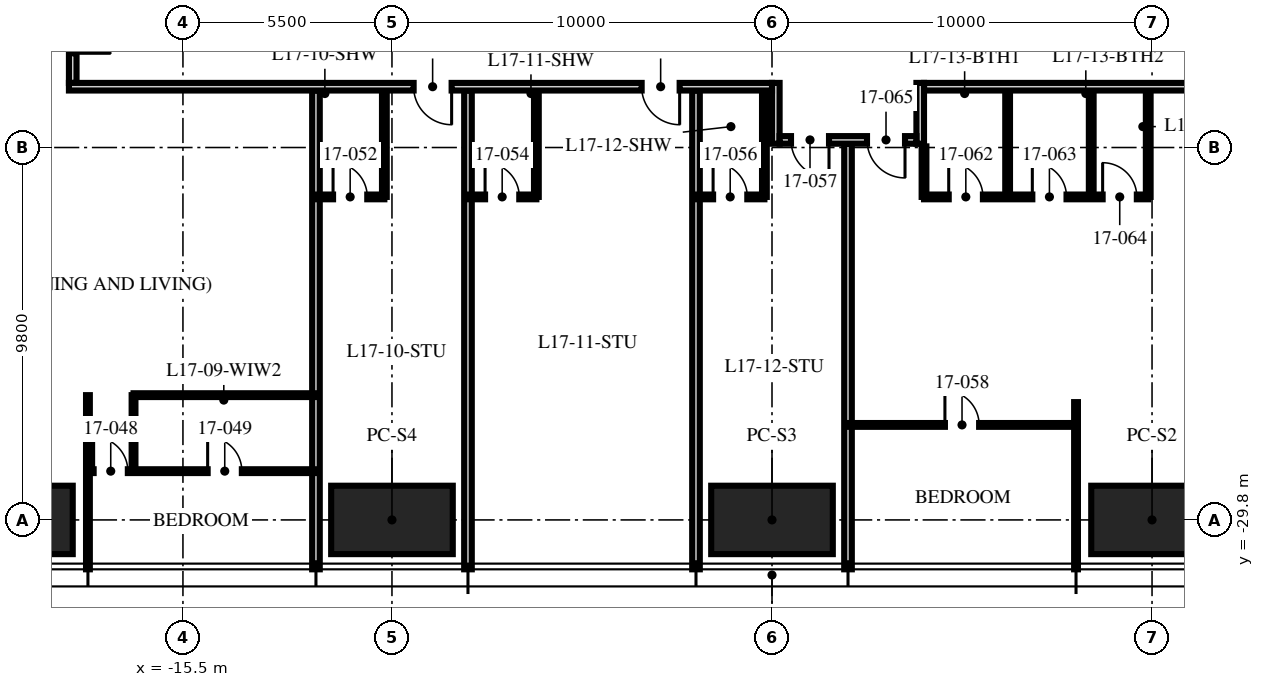
"""IFC4 building model, lengths in metres.
Left out: names, types, materials, properties, quantities, classifications, styles, units other than length and angle.
Written with IfcOpenShell. Run it as: python <this file> out.ifc"""

import sys

from ifc_helpers import new_model, si_unit, direction, frame, frame_2d, origin, origin_2d, place, context, subcontext, project, spatial, rectangle, hollow_rectangle, extrude, element, fill, save


model = new_model("IFC4")
c1 = context("Model", 3, precision=1e-05, world=origin(), true_north=direction((0.0, 1.0)))
c2 = subcontext(c1, "Body", "Model", "MODEL_VIEW")
j1 = project(units=[si_unit("LENGTHUNIT", "METRE"), si_unit("PLANEANGLEUNIT", "RADIAN")], contexts=[c1])
p1 = place(None, origin())
s1 = spatial("IfcSite", under=j1, at=p1, CompositionType="ELEMENT")
p2 = place(p1, origin())
s2 = spatial("IfcBuilding", under=s1, at=p2, CompositionType="ELEMENT")
p3 = place(p2, frame((0.0, 0.0, 69.75)))
s3 = spatial("IfcBuildingStorey", under=s2, at=p3, CompositionType="ELEMENT", Elevation=69.75)
for number, where, z_axis, x_axis in (
    (1, (10.0, -29.8, 0.0), (0.0, 0.0, 1.0), (1.0, 0.0, 0.0)),
    (2, (0.0, -29.8, 0.0), (0.0, 0.0, 1.0), (1.0, 0.0, 0.0)),
    (3, (-10.0, -29.8, 0.0), (0.0, 0.0, 1.0), (1.0, 0.0, 0.0)),
    (4, (-20.0, -29.8, 0.0), (0.0, 0.0, 1.0), (1.0, 0.0, 0.0)),
):
    element("IfcColumn", number, at=place(p3, frame(where, z_axis=z_axis, x_axis=x_axis)), inside=s3, PredefinedType="COLUMN", context=c2, shape_type="SweptSolid", body=[
        extrude(hollow_rectangle(XDim=3.2, YDim=1.8, WallThickness=0.2, at=origin_2d()), origin(), (0.0, 0.0, 1.0), 3.75),
    ])
p4 = place(p3, frame((-18.0, -26.517, 0.0), z_axis=(0.0, 0.0, 1.0), x_axis=(0.0, -1.0, 0.0)))
e5 = element("IfcWall", 5, at=p4, inside=s3, PredefinedType="PARTITIONING", context=c2, shape_type="SweptSolid", body=[
    extrude(rectangle(XDim=4.583, YDim=0.1, at=frame_2d((2.292, 0.0))), origin(), (0.0, 0.0, 1.0), 2.71),
])
for number, where, z_axis, x_axis in (
    (6, (-12.0, -18.5, 0.0), (0.0, 0.0, 1.0), (0.0, -1.0, 0.0)),
    (7, (-8.0, -18.5, 0.0), (0.0, 0.0, 1.0), (0.0, -1.0, 0.0)),
    (8, (-2.0, -18.5, 0.0), (0.0, 0.0, 1.0), (0.0, -1.0, 0.0)),
):
    element("IfcWall", number, at=place(p3, frame(where, z_axis=z_axis, x_axis=x_axis)), inside=s3, PredefinedType="PARTITIONING", context=c2, shape_type="SweptSolid", body=[
        extrude(rectangle(XDim=12.6, YDim=0.2, at=frame_2d((6.3, 0.0))), origin(), (0.0, 0.0, 1.0), 2.71),
    ])
p5 = place(p3, frame((2.0, -19.9, 0.0), z_axis=(0.0, 0.0, 1.0), x_axis=(0.0, -1.0, 0.0)))
e9 = element("IfcWall", 9, at=p5, inside=s3, PredefinedType="PARTITIONING", context=c2, shape_type="SweptSolid", body=[
    extrude(rectangle(XDim=11.2, YDim=0.2, at=frame_2d((5.6, 0.0))), origin(), (0.0, 0.0, 1.0), 2.71),
])
p6 = place(p3, frame((8.0, -26.7, 0.0), z_axis=(0.0, 0.0, 1.0), x_axis=(0.0, -1.0, 0.0)))
e10 = element("IfcWall", 10, at=p6, inside=s3, PredefinedType="PARTITIONING", context=c2, shape_type="SweptSolid", body=[
    extrude(rectangle(XDim=4.4, YDim=0.1, at=frame_2d((2.2, 0.0))), origin(), (0.0, 0.0, 1.0), 2.71),
])
p7 = place(p3, frame((-18.0, -28.517, 0.0), z_axis=(0.0, 0.0, 1.0), x_axis=(1.0, 0.0, 0.0)))
e11 = element("IfcWall", 11, at=p7, inside=s3, PredefinedType="PARTITIONING", context=c2, shape_type="SweptSolid", body=[
    extrude(rectangle(XDim=6.0, YDim=0.1, at=frame_2d((3.0, 0.0))), origin(), (0.0, 0.0, 1.0), 2.61),
])
p8 = place(p7, frame((0.15, 0.0, 0.0)))
e12 = element("IfcOpeningElement", 12, at=p8, cuts=e11, PredefinedType="OPENING", context=c2, shape_type="SweptSolid", body=[
    extrude(rectangle(XDim=0.9, YDim=2.1, at=frame_2d((0.45, 1.05))), frame((0.0, 0.06, 0.0), z_axis=(0.0, -1.0, 0.0), x_axis=(1.0, 0.0, 0.0)), (0.0, 0.0, 1.0), 0.12),
])
p9 = place(p7, frame((3.15, 0.0, 0.0)))
e13 = element("IfcOpeningElement", 13, at=p9, cuts=e11, PredefinedType="OPENING", context=c2, shape_type="SweptSolid", body=[
    extrude(rectangle(XDim=0.9, YDim=2.1, at=frame_2d((0.45, 1.05))), frame((0.0, 0.06, 0.0), z_axis=(0.0, -1.0, 0.0), x_axis=(1.0, 0.0, 0.0)), (0.0, 0.0, 1.0), 0.12),
])
p10 = place(p3, frame((-16.8, -26.517, 0.0), z_axis=(0.0, 0.0, 1.0), x_axis=(0.0, -1.0, 0.0)))
e14 = element("IfcWall", 14, at=p10, inside=s3, PredefinedType="PARTITIONING", context=c2, shape_type="SweptSolid", body=[
    extrude(rectangle(XDim=2.0, YDim=0.1, at=frame_2d((1.0, 0.0))), origin(), (0.0, 0.0, 1.0), 3.5),
])
p11 = place(p3, frame((-16.8, -26.517, 0.0), z_axis=(0.0, 0.0, 1.0), x_axis=(1.0, 0.0, 0.0)))
e15 = element("IfcWall", 15, at=p11, inside=s3, PredefinedType="PARTITIONING", context=c2, shape_type="SweptSolid", body=[
    extrude(rectangle(XDim=4.8, YDim=0.1, at=frame_2d((2.4, 0.0))), origin(), (0.0, 0.0, 1.0), 2.61),
])
p12 = place(p3, frame((-12.0, -21.3, 0.0), z_axis=(0.0, 0.0, 1.0), x_axis=(1.0, 0.0, 0.0)))
e16 = element("IfcWall", 16, at=p12, inside=s3, PredefinedType="PARTITIONING", context=c2, shape_type="SweptSolid", body=[
    extrude(rectangle(XDim=1.8, YDim=0.125, at=frame_2d((0.9, 0.0))), origin(), (0.0, 0.0, 1.0), 3.5),
])
p13 = place(p12, frame((0.45, 0.0, 0.0)))
e17 = element("IfcOpeningElement", 17, at=p13, cuts=e16, PredefinedType="OPENING", context=c2, shape_type="SweptSolid", body=[
    extrude(rectangle(XDim=0.9, YDim=2.1, at=frame_2d((0.45, 1.05))), frame((0.0, 0.073, 0.0), z_axis=(0.0, -1.0, 0.0), x_axis=(1.0, 0.0, 0.0)), (0.0, 0.0, 1.0), 0.145),
])
p14 = place(p3, frame((-10.2, -18.5, 0.0), z_axis=(0.0, 0.0, 1.0), x_axis=(0.0, -1.0, 0.0)))
e18 = element("IfcWall", 18, at=p14, inside=s3, PredefinedType="PARTITIONING", context=c2, shape_type="SweptSolid", body=[
    extrude(rectangle(XDim=2.8, YDim=0.125, at=frame_2d((1.4, 0.0))), origin(), (0.0, 0.0, 1.0), 2.492),
])
p15 = place(p3, frame((-8.0, -21.3, 0.0), z_axis=(0.0, 0.0, 1.0), x_axis=(1.0, 0.0, 0.0)))
e19 = element("IfcWall", 19, at=p15, inside=s3, PredefinedType="PARTITIONING", context=c2, shape_type="SweptSolid", body=[
    extrude(rectangle(XDim=1.8, YDim=0.125, at=frame_2d((0.9, 0.0))), origin(), (0.0, 0.0, 1.0), 3.5),
])
p16 = place(p15, frame((0.45, 0.0, 0.0)))
e20 = element("IfcOpeningElement", 20, at=p16, cuts=e19, PredefinedType="OPENING", context=c2, shape_type="SweptSolid", body=[
    extrude(rectangle(XDim=0.9, YDim=2.1, at=frame_2d((0.45, 1.05))), frame((0.0, 0.073, 0.0), z_axis=(0.0, -1.0, 0.0), x_axis=(1.0, 0.0, 0.0)), (0.0, 0.0, 1.0), 0.145),
])
p17 = place(p3, frame((-6.2, -18.5, 0.0), z_axis=(0.0, 0.0, 1.0), x_axis=(0.0, -1.0, 0.0)))
e21 = element("IfcWall", 21, at=p17, inside=s3, PredefinedType="PARTITIONING", context=c2, shape_type="SweptSolid", body=[
    extrude(rectangle(XDim=2.8, YDim=0.125, at=frame_2d((1.4, 0.0))), origin(), (0.0, 0.0, 1.0), 3.5),
])
p18 = place(p3, frame((-2.0, -21.3, 0.0), z_axis=(0.0, 0.0, 1.0), x_axis=(1.0, 0.0, 0.0)))
e22 = element("IfcWall", 22, at=p18, inside=s3, PredefinedType="PARTITIONING", context=c2, shape_type="SweptSolid", body=[
    extrude(rectangle(XDim=1.8, YDim=0.125, at=frame_2d((0.9, 0.0))), origin(), (0.0, 0.0, 1.0), 3.5),
])
p19 = place(p18, frame((0.45, 0.0, 0.0)))
e23 = element("IfcOpeningElement", 23, at=p19, cuts=e22, PredefinedType="OPENING", context=c2, shape_type="SweptSolid", body=[
    extrude(rectangle(XDim=0.9, YDim=2.1, at=frame_2d((0.45, 1.05))), frame((0.0, 0.073, 0.0), z_axis=(0.0, -1.0, 0.0), x_axis=(1.0, 0.0, 0.0)), (0.0, 0.0, 1.0), 0.145),
])
p20 = place(p3, frame((-0.2, -18.5, 0.0), z_axis=(0.0, 0.0, 1.0), x_axis=(0.0, -1.0, 0.0)))
e24 = element("IfcWall", 24, at=p20, inside=s3, PredefinedType="PARTITIONING", context=c2, shape_type="SweptSolid", body=[
    extrude(rectangle(XDim=2.8, YDim=0.125, at=frame_2d((1.4, 0.0))), origin(), (0.0, 0.0, 1.0), 2.492),
])
p21 = place(p3, frame((2.0, -27.3, 0.0), z_axis=(0.0, 0.0, 1.0), x_axis=(1.0, 0.0, 0.0)))
e25 = element("IfcWall", 25, at=p21, inside=s3, PredefinedType="PARTITIONING", context=c2, shape_type="SweptSolid", body=[
    extrude(rectangle(XDim=6.0, YDim=0.1, at=frame_2d((3.0, 0.0))), origin(), (0.0, 0.0, 1.0), 2.61),
])
p22 = place(p21, frame((2.55, 0.0, 0.0)))
e26 = element("IfcOpeningElement", 26, at=p22, cuts=e25, PredefinedType="OPENING", context=c2, shape_type="SweptSolid", body=[
    extrude(rectangle(XDim=0.9, YDim=2.1, at=frame_2d((0.45, 1.05))), frame((0.0, 0.06, 0.0), z_axis=(0.0, -1.0, 0.0), x_axis=(1.0, 0.0, 0.0)), (0.0, 0.0, 1.0), 0.12),
])
p23 = place(p3, frame((4.0, -21.3, 0.0), z_axis=(0.0, 0.0, 1.0), x_axis=(1.0, 0.0, 0.0)))
e27 = element("IfcWall", 27, at=p23, inside=s3, PredefinedType="PARTITIONING", context=c2, shape_type="SweptSolid", body=[
    extrude(rectangle(XDim=5.9, YDim=0.125, at=frame_2d((2.95, 0.0))), origin(), (0.0, 0.0, 1.0), 2.492),
])
p24 = place(p23, frame((0.65, 0.0, 0.0)))
e28 = element("IfcOpeningElement", 28, at=p24, cuts=e27, PredefinedType="OPENING", context=c2, shape_type="SweptSolid", body=[
    extrude(rectangle(XDim=0.9, YDim=2.1, at=frame_2d((0.45, 1.05))), frame((0.0, 0.073, 0.0), z_axis=(0.0, -1.0, 0.0), x_axis=(1.0, 0.0, 0.0)), (0.0, 0.0, 1.0), 0.145),
])
p25 = place(p23, frame((2.85, 0.0, 0.0)))
e29 = element("IfcOpeningElement", 29, at=p25, cuts=e27, PredefinedType="OPENING", context=c2, shape_type="SweptSolid", body=[
    extrude(rectangle(XDim=0.9, YDim=2.1, at=frame_2d((0.45, 1.05))), frame((0.0, 0.073, 0.0), z_axis=(0.0, -1.0, 0.0), x_axis=(1.0, 0.0, 0.0)), (0.0, 0.0, 1.0), 0.145),
])
p26 = place(p23, frame((4.7, 0.0, 0.0)))
e30 = element("IfcOpeningElement", 30, at=p26, cuts=e27, PredefinedType="OPENING", context=c2, shape_type="SweptSolid", body=[
    extrude(rectangle(XDim=0.9, YDim=2.1, at=frame_2d((0.45, 1.05))), frame((0.0, 0.073, 0.0), z_axis=(0.0, -1.0, 0.0), x_axis=(1.0, 0.0, 0.0)), (0.0, 0.0, 1.0), 0.145),
])
p27 = place(p3, frame((4.0, -19.97, 0.0), z_axis=(0.0, 0.0, 1.0), x_axis=(0.0, -1.0, 0.0)))
e31 = element("IfcWall", 31, at=p27, inside=s3, PredefinedType="PARTITIONING", context=c2, shape_type="SweptSolid", body=[
    extrude(rectangle(XDim=1.33, YDim=0.125, at=frame_2d((0.665, 0.0))), origin(), (0.0, 0.0, 1.0), 3.5),
])
for number, where, z_axis, x_axis in (
    (32, (6.2, -18.5, 0.0), (0.0, 0.0, 1.0), (0.0, -1.0, 0.0)),
    (33, (8.4, -18.5, 0.0), (0.0, 0.0, 1.0), (0.0, -1.0, 0.0)),
):
    element("IfcWall", number, at=place(p3, frame(where, z_axis=z_axis, x_axis=x_axis)), inside=s3, PredefinedType="PARTITIONING", context=c2, shape_type="SweptSolid", body=[
        extrude(rectangle(XDim=2.8, YDim=0.125, at=frame_2d((1.4, 0.0))), origin(), (0.0, 0.0, 1.0), 3.5),
    ])
p28 = place(p3, frame((9.9, -18.5, 0.0), z_axis=(0.0, 0.0, 1.0), x_axis=(0.0, -1.0, 0.0)))
e34 = element("IfcWall", 34, at=p28, inside=s3, PredefinedType="PARTITIONING", context=c2, shape_type="SweptSolid", body=[
    extrude(rectangle(XDim=2.8, YDim=0.125, at=frame_2d((1.4, 0.0))), origin(), (0.0, 0.0, 1.0), 2.492),
])
p29 = place(p3, frame((-18.4, 18.3, 0.0), z_axis=(0.0, 0.0, 1.0), x_axis=(0.0, -1.0, 0.0)))
e35 = element("IfcWall", 35, at=p29, inside=s3, PredefinedType="PARTITIONING", context=c2, shape_type="SweptSolid", body=[
    extrude(rectangle(XDim=36.6, YDim=0.2, at=frame_2d((18.3, 0.0))), origin(), (0.0, 0.0, 1.0), 2.3),
])
p30 = place(p29, frame((8.57, 0.0, 0.0)))
e36 = element("IfcOpeningElement", 36, at=p30, cuts=e35, PredefinedType="OPENING", context=c2, shape_type="SweptSolid", body=[
    extrude(rectangle(XDim=1.0, YDim=2.2, at=frame_2d((0.5, 1.1))), frame((0.0, 0.11, 0.0), z_axis=(0.0, -1.0, 0.0), x_axis=(1.0, 0.0, 0.0)), (0.0, 0.0, 1.0), 0.22),
])
p31 = place(p29, frame((14.87, 0.0, 0.0)))
e37 = element("IfcOpeningElement", 37, at=p31, cuts=e35, PredefinedType="OPENING", context=c2, shape_type="SweptSolid", body=[
    extrude(rectangle(XDim=1.0, YDim=2.2, at=frame_2d((0.5, 1.1))), frame((0.0, 0.11, 0.0), z_axis=(0.0, -1.0, 0.0), x_axis=(1.0, 0.0, 0.0)), (0.0, 0.0, 1.0), 0.22),
])
p32 = place(p29, frame((18.87, 0.0, 0.0)))
e38 = element("IfcOpeningElement", 38, at=p32, cuts=e35, PredefinedType="OPENING", context=c2, shape_type="SweptSolid", body=[
    extrude(rectangle(XDim=1.0, YDim=2.2, at=frame_2d((0.5, 1.1))), frame((0.0, 0.11, 0.0), z_axis=(0.0, -1.0, 0.0), x_axis=(1.0, 0.0, 0.0)), (0.0, 0.0, 1.0), 0.22),
])
p33 = place(p29, frame((34.82, 0.0, 0.0)))
e39 = element("IfcOpeningElement", 39, at=p33, cuts=e35, PredefinedType="OPENING", context=c2, shape_type="SweptSolid", body=[
    extrude(rectangle(XDim=1.0, YDim=2.2, at=frame_2d((0.5, 1.1))), frame((0.0, 0.11, 0.0), z_axis=(0.0, -1.0, 0.0), x_axis=(1.0, 0.0, 0.0)), (0.0, 0.0, 1.0), 0.22),
])
p34 = place(p3, frame((18.5, -18.4, 0.0), z_axis=(0.0, 0.0, 1.0), x_axis=(-1.0, 0.0, 0.0)))
e40 = element("IfcWall", 40, at=p34, inside=s3, PredefinedType="PARTITIONING", context=c2, shape_type="SweptSolid", body=[
    extrude(rectangle(XDim=14.5, YDim=0.2, at=frame_2d((7.25, 0.0))), origin(), (0.0, 0.0, 1.0), 2.3),
])
p35 = place(p3, frame((3.9, -18.3, 0.0), z_axis=(0.0, 0.0, 1.0), x_axis=(0.0, -1.0, 0.0)))
e41 = element("IfcWall", 41, at=p35, inside=s3, PredefinedType="PARTITIONING", context=c2, shape_type="SweptSolid", body=[
    extrude(rectangle(XDim=1.6, YDim=0.2, at=frame_2d((0.8, 0.0))), origin(), (0.0, 0.0, 1.0), 3.5),
])
p36 = place(p3, frame((0.1, -18.3, 0.0), z_axis=(0.0, 0.0, 1.0), x_axis=(0.0, -1.0, 0.0)))
e42 = element("IfcWall", 42, at=p36, inside=s3, PredefinedType="PARTITIONING", context=c2, shape_type="SweptSolid", body=[
    extrude(rectangle(XDim=1.6, YDim=0.2, at=frame_2d((0.8, 0.0))), origin(), (0.0, 0.0, 1.0), 2.492),
])
p37 = place(p3, frame((3.8, -19.8, 0.0), z_axis=(0.0, 0.0, 1.0), x_axis=(-1.0, 0.0, 0.0)))
e43 = element("IfcWall", 43, at=p37, inside=s3, PredefinedType="PARTITIONING", context=c2, shape_type="SweptSolid", body=[
    extrude(rectangle(XDim=3.6, YDim=0.2, at=frame_2d((1.8, 0.0))), origin(), (0.0, 0.0, 1.0), 3.5),
])
p38 = place(p37, frame((2.3, 0.0, 0.0)))
e44 = element("IfcOpeningElement", 44, at=p38, cuts=e43, PredefinedType="OPENING", context=c2, shape_type="SweptSolid", body=[
    extrude(rectangle(XDim=1.0, YDim=2.2, at=frame_2d((0.5, 1.1))), frame((0.0, 0.11, 0.0), z_axis=(0.0, -1.0, 0.0), x_axis=(1.0, 0.0, 0.0)), (0.0, 0.0, 1.0), 0.22),
])
p39 = place(p37, frame((0.3, 0.0, 0.0)))
e45 = element("IfcOpeningElement", 45, at=p39, cuts=e43, PredefinedType="OPENING", context=c2, shape_type="SweptSolid", body=[
    extrude(rectangle(XDim=1.0, YDim=2.2, at=frame_2d((0.5, 1.1))), frame((0.0, 0.11, 0.0), z_axis=(0.0, -1.0, 0.0), x_axis=(1.0, 0.0, 0.0)), (0.0, 0.0, 1.0), 0.22),
])
p40 = place(p3, frame((0.0, -18.4, 0.0), z_axis=(0.0, 0.0, 1.0), x_axis=(-1.0, 0.0, 0.0)))
e46 = element("IfcWall", 46, at=p40, inside=s3, PredefinedType="PARTITIONING", context=c2, shape_type="SweptSolid", body=[
    extrude(rectangle(XDim=18.5, YDim=0.2, at=frame_2d((9.25, 0.0))), origin(), (0.0, 0.0, 1.0), 2.3),
])
p41 = place(p40, frame((8.43, 0.0, 0.0)))
e47 = element("IfcOpeningElement", 47, at=p41, cuts=e46, PredefinedType="OPENING", context=c2, shape_type="SweptSolid", body=[
    extrude(rectangle(XDim=1.0, YDim=2.2, at=frame_2d((0.5, 1.1))), frame((0.0, 0.11, 0.0), z_axis=(0.0, -1.0, 0.0), x_axis=(1.0, 0.0, 0.0)), (0.0, 0.0, 1.0), 0.22),
])
p42 = place(p40, frame((2.43, 0.0, 0.0)))
e48 = element("IfcOpeningElement", 48, at=p42, cuts=e46, PredefinedType="OPENING", context=c2, shape_type="SweptSolid", body=[
    extrude(rectangle(XDim=1.0, YDim=2.2, at=frame_2d((0.5, 1.1))), frame((0.0, 0.11, 0.0), z_axis=(0.0, -1.0, 0.0), x_axis=(1.0, 0.0, 0.0)), (0.0, 0.0, 1.0), 0.22),
])
p43 = place(p8, origin())
e49 = element("IfcDoor", 49, at=p43, inside=s3, OperationType="SINGLE_SWING_LEFT", PredefinedType="DOOR", context=c2, shape_type="SweptSolid", body=[
    extrude(rectangle(XDim=0.9, YDim=2.1, at=frame_2d((0.45, 1.05))), frame((0.0, 0.025, 0.0), z_axis=(0.0, -1.0, 0.0), x_axis=(1.0, 0.0, 0.0)), (0.0, 0.0, 1.0), 0.05),
])
fill(e12, e49)
p44 = place(p9, origin())
e50 = element("IfcDoor", 50, at=p44, inside=s3, OperationType="SINGLE_SWING_LEFT", PredefinedType="DOOR", context=c2, shape_type="SweptSolid", body=[
    extrude(rectangle(XDim=0.9, YDim=2.1, at=frame_2d((0.45, 1.05))), frame((0.0, 0.025, 0.0), z_axis=(0.0, -1.0, 0.0), x_axis=(1.0, 0.0, 0.0)), (0.0, 0.0, 1.0), 0.05),
])
fill(e13, e50)
p45 = place(p33, origin())
e51 = element("IfcDoor", 51, at=p45, inside=s3, OperationType="SINGLE_SWING_RIGHT", PredefinedType="DOOR", context=c2, shape_type="SweptSolid", body=[
    extrude(rectangle(XDim=1.0, YDim=2.2, at=frame_2d((0.5, 1.1))), frame((0.0, 0.025, 0.0), z_axis=(0.0, -1.0, 0.0), x_axis=(1.0, 0.0, 0.0)), (0.0, 0.0, 1.0), 0.05),
])
fill(e39, e51)
p46 = place(p13, origin())
e52 = element("IfcDoor", 52, at=p46, inside=s3, OperationType="SINGLE_SWING_LEFT", PredefinedType="DOOR", context=c2, shape_type="SweptSolid", body=[
    extrude(rectangle(XDim=0.9, YDim=2.1, at=frame_2d((0.45, 1.05))), frame((0.0, 0.025, 0.0), z_axis=(0.0, -1.0, 0.0), x_axis=(1.0, 0.0, 0.0)), (0.0, 0.0, 1.0), 0.05),
])
fill(e17, e52)
p47 = place(p41, origin())
e53 = element("IfcDoor", 53, at=p47, inside=s3, OperationType="SINGLE_SWING_LEFT", PredefinedType="DOOR", context=c2, shape_type="SweptSolid", body=[
    extrude(rectangle(XDim=1.0, YDim=2.2, at=frame_2d((0.5, 1.1))), frame((0.0, 0.025, 0.0), z_axis=(0.0, -1.0, 0.0), x_axis=(1.0, 0.0, 0.0)), (0.0, 0.0, 1.0), 0.05),
])
fill(e47, e53)
p48 = place(p16, origin())
e54 = element("IfcDoor", 54, at=p48, inside=s3, OperationType="SINGLE_SWING_LEFT", PredefinedType="DOOR", context=c2, shape_type="SweptSolid", body=[
    extrude(rectangle(XDim=0.9, YDim=2.1, at=frame_2d((0.45, 1.05))), frame((0.0, 0.025, 0.0), z_axis=(0.0, -1.0, 0.0), x_axis=(1.0, 0.0, 0.0)), (0.0, 0.0, 1.0), 0.05),
])
fill(e20, e54)
p49 = place(p42, origin())
e55 = element("IfcDoor", 55, at=p49, inside=s3, OperationType="SINGLE_SWING_LEFT", PredefinedType="DOOR", context=c2, shape_type="SweptSolid", body=[
    extrude(rectangle(XDim=1.0, YDim=2.2, at=frame_2d((0.5, 1.1))), frame((0.0, 0.025, 0.0), z_axis=(0.0, -1.0, 0.0), x_axis=(1.0, 0.0, 0.0)), (0.0, 0.0, 1.0), 0.05),
])
fill(e48, e55)
p50 = place(p19, origin())
e56 = element("IfcDoor", 56, at=p50, inside=s3, OperationType="SINGLE_SWING_LEFT", PredefinedType="DOOR", context=c2, shape_type="SweptSolid", body=[
    extrude(rectangle(XDim=0.9, YDim=2.1, at=frame_2d((0.45, 1.05))), frame((0.0, 0.025, 0.0), z_axis=(0.0, -1.0, 0.0), x_axis=(1.0, 0.0, 0.0)), (0.0, 0.0, 1.0), 0.05),
])
fill(e23, e56)
p51 = place(p38, origin())
e57 = element("IfcDoor", 57, at=p51, inside=s3, OperationType="SINGLE_SWING_LEFT", PredefinedType="DOOR", context=c2, shape_type="SweptSolid", body=[
    extrude(rectangle(XDim=1.0, YDim=2.2, at=frame_2d((0.5, 1.1))), frame((0.0, 0.025, 0.0), z_axis=(0.0, -1.0, 0.0), x_axis=(1.0, 0.0, 0.0)), (0.0, 0.0, 1.0), 0.05),
])
fill(e44, e57)
p52 = place(p22, origin())
e58 = element("IfcDoor", 58, at=p52, inside=s3, OperationType="SINGLE_SWING_LEFT", PredefinedType="DOOR", context=c2, shape_type="SweptSolid", body=[
    extrude(rectangle(XDim=0.9, YDim=2.1, at=frame_2d((0.45, 1.05))), frame((0.0, 0.025, 0.0), z_axis=(0.0, -1.0, 0.0), x_axis=(1.0, 0.0, 0.0)), (0.0, 0.0, 1.0), 0.05),
])
fill(e26, e58)
p53 = place(p24, origin())
e59 = element("IfcDoor", 59, at=p53, inside=s3, OperationType="SINGLE_SWING_LEFT", PredefinedType="DOOR", context=c2, shape_type="SweptSolid", body=[
    extrude(rectangle(XDim=0.9, YDim=2.1, at=frame_2d((0.45, 1.05))), frame((0.0, 0.025, 0.0), z_axis=(0.0, -1.0, 0.0), x_axis=(1.0, 0.0, 0.0)), (0.0, 0.0, 1.0), 0.05),
])
fill(e28, e59)
p54 = place(p25, origin())
e60 = element("IfcDoor", 60, at=p54, inside=s3, OperationType="SINGLE_SWING_LEFT", PredefinedType="DOOR", context=c2, shape_type="SweptSolid", body=[
    extrude(rectangle(XDim=0.9, YDim=2.1, at=frame_2d((0.45, 1.05))), frame((0.0, 0.025, 0.0), z_axis=(0.0, -1.0, 0.0), x_axis=(1.0, 0.0, 0.0)), (0.0, 0.0, 1.0), 0.05),
])
fill(e29, e60)
p55 = place(p26, origin())
e61 = element("IfcDoor", 61, at=p55, inside=s3, OperationType="SINGLE_SWING_LEFT", PredefinedType="DOOR", context=c2, shape_type="SweptSolid", body=[
    extrude(rectangle(XDim=0.9, YDim=2.1, at=frame_2d((0.45, 1.05))), frame((0.0, 0.025, 0.0), z_axis=(0.0, -1.0, 0.0), x_axis=(1.0, 0.0, 0.0)), (0.0, 0.0, 1.0), 0.05),
])
fill(e30, e61)
p56 = place(p39, origin())
e62 = element("IfcDoor", 62, at=p56, inside=s3, OperationType="SINGLE_SWING_LEFT", PredefinedType="DOOR", context=c2, shape_type="SweptSolid", body=[
    extrude(rectangle(XDim=1.0, YDim=2.2, at=frame_2d((0.5, 1.1))), frame((0.0, 0.025, 0.0), z_axis=(0.0, -1.0, 0.0), x_axis=(1.0, 0.0, 0.0)), (0.0, 0.0, 1.0), 0.05),
])
fill(e45, e62)
save(model, sys.argv[1])
